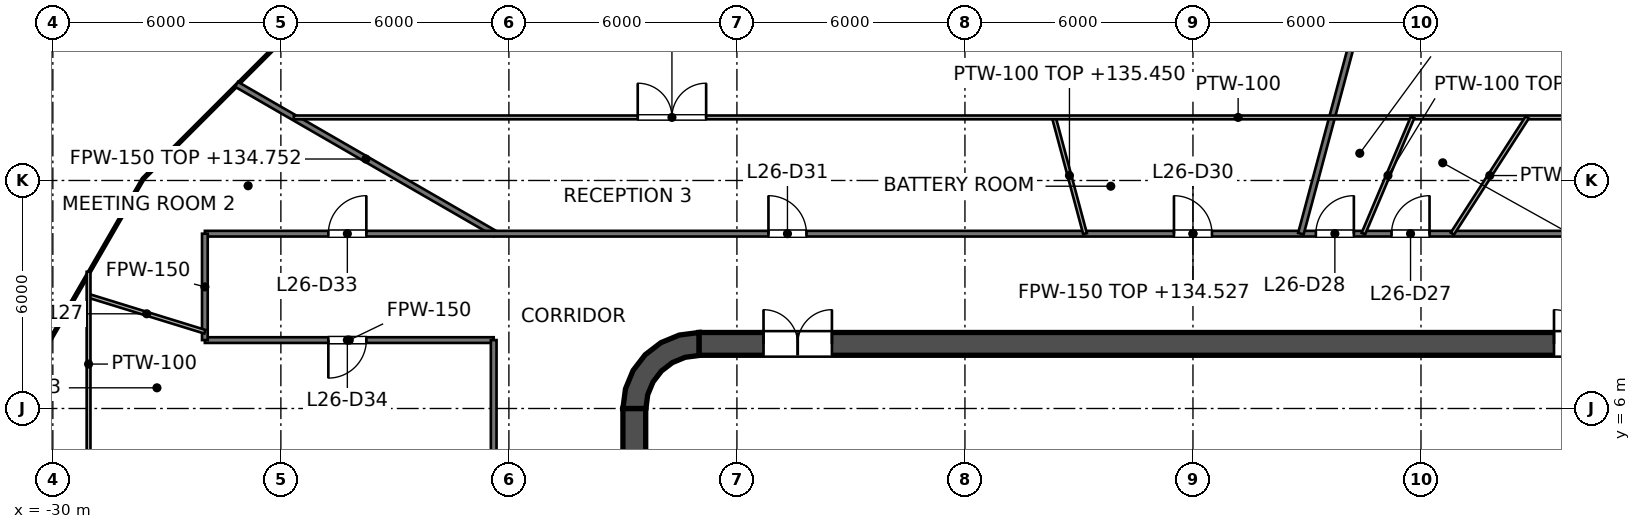
"""IFC4 building model, lengths in metres.
Left out: names, types, materials, properties, quantities, classifications, styles, units other than length and angle.
Written with IfcOpenShell. Run it as: python <this file> out.ifc"""

import sys

from ifc_helpers import new_model, si_unit, direction, frame, frame_2d, origin, place, context, subcontext, project, spatial, polyline, rectangle, outline, extrude, element, fill, save


model = new_model("IFC4")
c1 = context("Model", 3, precision=1e-05, world=origin(), true_north=direction((0.0, 1.0)))
c2 = subcontext(c1, "Body", "Model", "MODEL_VIEW")
j1 = project(units=[si_unit("LENGTHUNIT", "METRE"), si_unit("PLANEANGLEUNIT", "RADIAN")], contexts=[c1])
p1 = place(None, origin())
s1 = spatial("IfcSite", under=j1, at=p1, CompositionType="ELEMENT")
p2 = place(p1, origin())
s2 = spatial("IfcBuilding", under=s1, at=p2, CompositionType="ELEMENT")
p3 = place(p2, frame((0.0, 0.0, 131.4)))
s3 = spatial("IfcBuildingStorey", under=s2, at=p3, CompositionType="ELEMENT", Elevation=131.4)
p4 = place(p3, frame((-13.0, 7.7, 0.0), z_axis=(0.0, 0.0, 1.0), x_axis=(1.0, 0.0, 0.0)))
e1 = element("IfcWall", 1, at=p4, inside=s3, PredefinedType="SHEAR", context=c2, shape_type="SweptSolid", body=[
    extrude(rectangle(XDim=26.0, YDim=0.6, at=frame_2d((13.0, 0.0))), origin(), (0.0, 0.0, 1.0), 4.2),
])
p5 = place(p4, frame((1.7, 0.0, 0.0)))
e2 = element("IfcOpeningElement", 2, at=p5, cuts=e1, PredefinedType="OPENING", context=c2, shape_type="SweptSolid", body=[
    extrude(rectangle(XDim=1.8, YDim=2.1, at=frame_2d((0.9, 1.05))), frame((0.0, 0.3, 0.0), z_axis=(0.0, -1.0, 0.0), x_axis=(1.0, 0.0, 0.0)), (0.0, 0.0, 1.0), 0.6),
])
p6 = place(p4, frame((22.5, 0.0, 0.0)))
e3 = element("IfcOpeningElement", 3, at=p6, cuts=e1, PredefinedType="OPENING", context=c2, shape_type="SweptSolid", body=[
    extrude(rectangle(XDim=1.8, YDim=2.1, at=frame_2d((0.9, 1.05))), frame((0.0, 0.3, 0.0), z_axis=(0.0, -1.0, 0.0), x_axis=(1.0, 0.0, 0.0)), (0.0, 0.0, 1.0), 0.6),
])
p7 = place(p3, frame((-14.7, -6.0, 0.0), z_axis=(0.0, 0.0, 1.0), x_axis=(0.0, 1.0, 0.0)))
e4 = element("IfcWall", 4, at=p7, inside=s3, PredefinedType="SHEAR", context=c2, shape_type="SweptSolid", body=[
    extrude(rectangle(XDim=12.0, YDim=0.6, at=frame_2d((6.0, 0.0))), origin(), (0.0, 0.0, 1.0), 4.2),
])
p8 = place(p3, origin())
e5 = element("IfcWall", 5, at=p8, inside=s3, PredefinedType="SHEAR", context=c2, shape_type="SweptSolid", body=[
    extrude(outline(polyline([(-15.0, 6.0), (-14.395, 6.0), (-14.347, 6.361), (-14.208, 6.698), (-13.986, 6.986), (-13.698, 7.208), (-13.361, 7.347), (-13.0, 7.395), (-13.0, 8.0), (-13.518, 7.932), (-14.0, 7.732), (-14.414, 7.414), (-14.732, 7.0), (-14.932, 6.518), (-15.0, 6.0)])), origin(), (0.0, 0.0, 1.0), 4.2),
])
p9 = place(p3, frame((-9.0, 4.1, 0.0), z_axis=(0.0, 0.0, 1.0), x_axis=(0.0, 1.0, 0.0)))
e6 = element("IfcWall", 6, at=p9, inside=s3, PredefinedType="SOLIDWALL", context=c2, shape_type="SweptSolid", body=[
    extrude(rectangle(XDim=2.5, YDim=0.25, at=frame_2d((1.25, 0.0))), origin(), (0.0, 0.0, 1.0), 4.05),
])
p10 = place(p9, frame((0.65, 0.0, 0.0)))
e7 = element("IfcOpeningElement", 7, at=p10, cuts=e6, PredefinedType="OPENING", context=c2, shape_type="SweptSolid", body=[
    extrude(rectangle(XDim=1.2, YDim=2.1, at=frame_2d((0.6, 1.05))), frame((0.0, 0.125, 0.0), z_axis=(0.0, -1.0, 0.0), x_axis=(1.0, 0.0, 0.0)), (0.0, 0.0, 1.0), 0.25),
])
p11 = place(p3, frame((9.0, 4.1, 0.0), z_axis=(0.0, 0.0, 1.0), x_axis=(0.0, 1.0, 0.0)))
e8 = element("IfcWall", 8, at=p11, inside=s3, PredefinedType="SOLIDWALL", context=c2, shape_type="SweptSolid", body=[
    extrude(rectangle(XDim=2.5, YDim=0.25, at=frame_2d((1.25, 0.0))), origin(), (0.0, 0.0, 1.0), 4.05),
])
p12 = place(p11, frame((0.65, 0.0, 0.0)))
e9 = element("IfcOpeningElement", 9, at=p12, cuts=e8, PredefinedType="OPENING", context=c2, shape_type="SweptSolid", body=[
    extrude(rectangle(XDim=1.2, YDim=2.1, at=frame_2d((0.6, 1.05))), frame((0.0, 0.125, 0.0), z_axis=(0.0, -1.0, 0.0), x_axis=(1.0, 0.0, 0.0)), (0.0, 0.0, 1.0), 0.25),
])
for number, where, z_axis, x_axis in (
    (10, (-3.15, 4.1, 0.0), (0.0, 0.0, 1.0), (0.0, 1.0, 0.0)),
    (11, (3.15, 4.1, 0.0), (0.0, 0.0, 1.0), (0.0, 1.0, 0.0)),
):
    element("IfcWall", number, at=place(p3, frame(where, z_axis=z_axis, x_axis=x_axis)), inside=s3, PredefinedType="SOLIDWALL", context=c2, shape_type="SweptSolid", body=[
        extrude(rectangle(XDim=2.5, YDim=0.25, at=frame_2d((1.25, 0.0))), origin(), (0.0, 0.0, 1.0), 4.05),
    ])
p13 = place(p3, frame((-9.125, 7.0, 0.0), z_axis=(0.0, 0.0, 1.0), x_axis=(1.0, 0.0, 0.0)))
e12 = element("IfcWall", 12, at=p13, inside=s3, PredefinedType="SOLIDWALL", context=c2, shape_type="SweptSolid", body=[
    extrude(rectangle(XDim=18.25, YDim=0.8, at=frame_2d((9.125, 0.0))), origin(), (0.0, 0.0, 1.0), 4.05),
])
p14 = place(p3, frame((-11.8, -7.4, 0.0), z_axis=(0.0, 0.0, 1.0), x_axis=(0.0, 1.0, 0.0)))
e13 = element("IfcWall", 13, at=p14, inside=s3, PredefinedType="SOLIDWALL", context=c2, shape_type="SweptSolid", body=[
    extrude(rectangle(XDim=14.8, YDim=0.4, at=frame_2d((7.4, 0.0))), origin(), (0.0, 0.0, 1.0), 4.05),
])
p15 = place(p14, frame((11.2, 0.0, 0.0)))
e14 = element("IfcOpeningElement", 14, at=p15, cuts=e13, PredefinedType="OPENING", context=c2, shape_type="SweptSolid", body=[
    extrude(rectangle(XDim=1.1, YDim=2.1, at=frame_2d((0.55, 1.05))), frame((0.0, 0.2, 0.0), z_axis=(0.0, -1.0, 0.0), x_axis=(1.0, 0.0, 0.0)), (0.0, 0.0, 1.0), 0.4),
])
p16 = place(p14, frame((8.3, 0.0, 0.0)))
e15 = element("IfcOpeningElement", 15, at=p16, cuts=e13, PredefinedType="OPENING", context=c2, shape_type="SweptSolid", body=[
    extrude(rectangle(XDim=1.1, YDim=2.1, at=frame_2d((0.55, 1.05))), frame((0.0, 0.2, 0.0), z_axis=(0.0, -1.0, 0.0), x_axis=(1.0, 0.0, 0.0)), (0.0, 0.0, 1.0), 0.4),
])
p17 = place(p14, frame((5.4, 0.0, 0.0)))
e16 = element("IfcOpeningElement", 16, at=p17, cuts=e13, PredefinedType="OPENING", context=c2, shape_type="SweptSolid", body=[
    extrude(rectangle(XDim=1.1, YDim=2.1, at=frame_2d((0.55, 1.05))), frame((0.0, 0.2, 0.0), z_axis=(0.0, -1.0, 0.0), x_axis=(1.0, 0.0, 0.0)), (0.0, 0.0, 1.0), 0.4),
])
p18 = place(p14, frame((13.552, 0.0, 0.0)))
e17 = element("IfcOpeningElement", 17, at=p18, cuts=e13, PredefinedType="OPENING", context=c2, shape_type="SweptSolid", body=[
    extrude(rectangle(XDim=0.9, YDim=2.1, at=frame_2d((0.45, 1.05))), frame((0.0, 0.2, 0.0), z_axis=(0.0, -1.0, 0.0), x_axis=(1.0, 0.0, 0.0)), (0.0, 0.0, 1.0), 0.4),
])
p19 = place(p14, frame((0.347, 0.0, 0.0)))
e18 = element("IfcOpeningElement", 18, at=p19, cuts=e13, PredefinedType="OPENING", context=c2, shape_type="SweptSolid", body=[
    extrude(rectangle(XDim=0.9, YDim=2.1, at=frame_2d((0.45, 1.05))), frame((0.0, 0.2, 0.0), z_axis=(0.0, -1.0, 0.0), x_axis=(1.0, 0.0, 0.0)), (0.0, 0.0, 1.0), 0.4),
])
e19 = element("IfcWall", 19, at=p8, inside=s3, PredefinedType="SOLIDWALL", context=c2, shape_type="SweptSolid", body=[
    extrude(outline(polyline([(-12.0, -5.925), (-12.0, -5.675), (-14.15, -5.675), (-14.15, -3.025), (-12.0, -3.025), (-12.0, -2.775), (-14.15, -2.775), (-14.15, -0.125), (-12.0, -0.125), (-12.0, 0.125), (-14.15, 0.125), (-14.15, 2.775), (-12.0, 2.775), (-12.0, 3.025), (-14.15, 3.025), (-14.15, 5.675), (-12.0, 5.675), (-12.0, 5.925), (-14.15, 5.925), (-14.4, 5.925), (-14.4, 5.675), (-14.4, 3.025), (-14.4, 2.775), (-14.4, 0.125), (-14.4, -0.125), (-14.4, -2.775), (-14.4, -3.025), (-14.4, -5.675), (-14.4, -5.925), (-14.15, -5.925), (-12.0, -5.925)])), origin(), (0.0, 0.0, 1.0), 4.05),
])
p20 = place(p3, frame((-25.166, 14.53, 0.0), z_axis=(0.0, 0.0, 1.0), x_axis=(0.866034552186, -0.499984154169, 0.0)))
e20 = element("IfcWall", 20, at=p20, inside=s3, PredefinedType="PARTITIONING", context=c2, shape_type="SweptSolid", body=[
    extrude(rectangle(XDim=7.86, YDim=0.15, at=frame_2d((3.93, 0.0))), origin(), (0.0, 0.0, 1.0), 3.352),
])
p21 = place(p3, frame((-26.0, 7.8, 0.0), z_axis=(0.0, 0.0, 1.0), x_axis=(1.0, 0.0, 0.0)))
e21 = element("IfcWall", 21, at=p21, inside=s3, PredefinedType="PARTITIONING", context=c2, shape_type="SweptSolid", body=[
    extrude(rectangle(XDim=7.6, YDim=0.15, at=frame_2d((3.8, 0.0))), origin(), (0.0, 0.0, 1.0), 3.276),
])
p22 = place(p21, frame((3.249, 0.0, 0.0)))
e22 = element("IfcOpeningElement", 22, at=p22, cuts=e21, PredefinedType="OPENING", context=c2, shape_type="SweptSolid", body=[
    extrude(rectangle(XDim=1.0, YDim=2.1, at=frame_2d((0.5, 1.05))), frame((0.0, 0.075, 0.0), z_axis=(0.0, -1.0, 0.0), x_axis=(1.0, 0.0, 0.0)), (0.0, 0.0, 1.0), 0.15),
])
p23 = place(p3, frame((-26.0, 10.6, 0.0), z_axis=(0.0, 0.0, 1.0), x_axis=(1.0, 0.0, 0.0)))
e23 = element("IfcWall", 23, at=p23, inside=s3, PredefinedType="PARTITIONING", context=c2, shape_type="SweptSolid", body=[
    extrude(rectangle(XDim=52.0, YDim=0.15, at=frame_2d((26.0, 0.0))), origin(), (0.0, 0.0, 1.0), 3.127),
])
p24 = place(p23, frame((41.863, 0.0, 0.0)))
e24 = element("IfcOpeningElement", 24, at=p24, cuts=e23, PredefinedType="OPENING", context=c2, shape_type="SweptSolid", body=[
    extrude(rectangle(XDim=1.2, YDim=2.1, at=frame_2d((0.6, 1.05))), frame((0.0, 0.075, 0.0), z_axis=(0.0, -1.0, 0.0), x_axis=(1.0, 0.0, 0.0)), (0.0, 0.0, 1.0), 0.15),
])
p25 = place(p23, frame((31.225, 0.0, 0.0)))
e25 = element("IfcOpeningElement", 25, at=p25, cuts=e23, PredefinedType="OPENING", context=c2, shape_type="SweptSolid", body=[
    extrude(rectangle(XDim=1.0, YDim=2.1, at=frame_2d((0.5, 1.05))), frame((0.0, 0.075, 0.0), z_axis=(0.0, -1.0, 0.0), x_axis=(1.0, 0.0, 0.0)), (0.0, 0.0, 1.0), 0.15),
])
p26 = place(p23, frame((29.234, 0.0, 0.0)))
e26 = element("IfcOpeningElement", 26, at=p26, cuts=e23, PredefinedType="OPENING", context=c2, shape_type="SweptSolid", body=[
    extrude(rectangle(XDim=1.0, YDim=2.1, at=frame_2d((0.5, 1.05))), frame((0.0, 0.075, 0.0), z_axis=(0.0, -1.0, 0.0), x_axis=(1.0, 0.0, 0.0)), (0.0, 0.0, 1.0), 0.15),
])
p27 = place(p23, frame((25.5, 0.0, 0.0)))
e27 = element("IfcOpeningElement", 27, at=p27, cuts=e23, PredefinedType="OPENING", context=c2, shape_type="SweptSolid", body=[
    extrude(rectangle(XDim=1.0, YDim=2.1, at=frame_2d((0.5, 1.05))), frame((0.0, 0.075, 0.0), z_axis=(0.0, -1.0, 0.0), x_axis=(1.0, 0.0, 0.0)), (0.0, 0.0, 1.0), 0.15),
])
p28 = place(p23, frame((14.83, 0.0, 0.0)))
e28 = element("IfcOpeningElement", 28, at=p28, cuts=e23, PredefinedType="OPENING", context=c2, shape_type="SweptSolid", body=[
    extrude(rectangle(XDim=1.0, YDim=2.1, at=frame_2d((0.5, 1.05))), frame((0.0, 0.075, 0.0), z_axis=(0.0, -1.0, 0.0), x_axis=(1.0, 0.0, 0.0)), (0.0, 0.0, 1.0), 0.15),
])
p29 = place(p23, frame((3.249, 0.0, 0.0)))
e29 = element("IfcOpeningElement", 29, at=p29, cuts=e23, PredefinedType="OPENING", context=c2, shape_type="SweptSolid", body=[
    extrude(rectangle(XDim=1.0, YDim=2.1, at=frame_2d((0.5, 1.05))), frame((0.0, 0.075, 0.0), z_axis=(0.0, -1.0, 0.0), x_axis=(1.0, 0.0, 0.0)), (0.0, 0.0, 1.0), 0.15),
])
p30 = place(p3, frame((2.84, 10.6, 0.0), z_axis=(0.0, 0.0, 1.0), x_axis=(0.258833974298, 0.9659218259, 0.0)))
e30 = element("IfcWall", 30, at=p30, inside=s3, PredefinedType="PARTITIONING", context=c2, shape_type="SweptSolid", body=[
    extrude(rectangle(XDim=13.464, YDim=0.15, at=frame_2d((6.732, 0.0))), origin(), (0.0, 0.0, 1.0), 3.502),
])
p31 = place(p3, frame((-18.4, -7.8, 0.0), z_axis=(0.0, 0.0, 1.0), x_axis=(0.0, 1.0, 0.0)))
e31 = element("IfcWall", 31, at=p31, inside=s3, PredefinedType="PARTITIONING", context=c2, shape_type="SweptSolid", body=[
    extrude(rectangle(XDim=15.6, YDim=0.15, at=frame_2d((7.8, 0.0))), origin(), (0.0, 0.0, 1.0), 3.127),
])
p32 = place(p31, frame((5.474, 0.0, 0.0)))
e32 = element("IfcOpeningElement", 32, at=p32, cuts=e31, PredefinedType="OPENING", context=c2, shape_type="SweptSolid", body=[
    extrude(rectangle(XDim=1.0, YDim=2.1, at=frame_2d((0.5, 1.05))), frame((0.0, 0.075, 0.0), z_axis=(0.0, -1.0, 0.0), x_axis=(1.0, 0.0, 0.0)), (0.0, 0.0, 1.0), 0.15),
])
p33 = place(p3, frame((-26.0, 7.8, 0.0), z_axis=(0.0, 0.0, 1.0), x_axis=(0.0, 1.0, 0.0)))
e33 = element("IfcWall", 33, at=p33, inside=s3, PredefinedType="PARTITIONING", context=c2, shape_type="SweptSolid", body=[
    extrude(rectangle(XDim=2.8, YDim=0.15, at=frame_2d((1.4, 0.0))), origin(), (0.0, 0.0, 1.0), 3.276),
])
p34 = place(p3, frame((-3.66, 13.66, 0.0), z_axis=(0.0, 0.0, 1.0), x_axis=(0.258804143637, -0.965929819001, 0.0)))
e34 = element("IfcWall", 34, at=p34, inside=s3, PredefinedType="PARTITIONING", context=c2, shape_type="SweptSolid", body=[
    extrude(rectangle(XDim=3.168, YDim=0.1, at=frame_2d((1.584, 0.0))), origin(), (0.0, 0.0, 1.0), 4.05),
])
p35 = place(p3, frame((-29.06, 8.964, 0.0), z_axis=(0.0, 0.0, 1.0), x_axis=(0.955556205091, -0.294808987162, 0.0)))
e35 = element("IfcWall", 35, at=p35, inside=s3, PredefinedType="PARTITIONING", context=c2, shape_type="SweptSolid", body=[
    extrude(rectangle(XDim=3.202, YDim=0.1, at=frame_2d((1.601, 0.0))), origin(), (0.0, 0.0, 1.0), 3.727),
])
p36 = place(p3, frame((-23.659, 13.66, 0.0), z_axis=(0.0, 0.0, 1.0), x_axis=(1.0, 0.0, 0.0)))
e36 = element("IfcWall", 36, at=p36, inside=s3, PredefinedType="PARTITIONING", context=c2, shape_type="SweptSolid", body=[
    extrude(rectangle(XDim=49.695, YDim=0.1, at=frame_2d((24.847, 0.0))), origin(), (0.0, 0.0, 1.0), 3.127),
])
p37 = place(p36, frame((40.675, 0.0, 0.0)))
e37 = element("IfcOpeningElement", 37, at=p37, cuts=e36, PredefinedType="OPENING", context=c2, shape_type="SweptSolid", body=[
    extrude(rectangle(XDim=0.9, YDim=2.1, at=frame_2d((0.45, 1.05))), frame((0.0, 0.05, 0.0), z_axis=(0.0, -1.0, 0.0), x_axis=(1.0, 0.0, 0.0)), (0.0, 0.0, 1.0), 0.1),
])
p38 = place(p36, frame((9.049, 0.0, 0.0)))
e38 = element("IfcOpeningElement", 38, at=p38, cuts=e36, PredefinedType="OPENING", context=c2, shape_type="SweptSolid", body=[
    extrude(rectangle(XDim=1.8, YDim=2.1, at=frame_2d((0.9, 1.05))), frame((0.0, 0.05, 0.0), z_axis=(0.0, -1.0, 0.0), x_axis=(1.0, 0.0, 0.0)), (0.0, 0.0, 1.0), 0.1),
])
p39 = place(p3, frame((6.825, 10.6, 0.0), z_axis=(0.0, 0.0, 1.0), x_axis=(0.541330496355, 0.840809903436, 0.0)))
e39 = element("IfcWall", 39, at=p39, inside=s3, PredefinedType="PARTITIONING", context=c2, shape_type="SweptSolid", body=[
    extrude(rectangle(XDim=3.639, YDim=0.1, at=frame_2d((1.82, 0.0))), origin(), (0.0, 0.0, 1.0), 4.05),
])
p40 = place(p3, frame((4.484, 10.6, 0.0), z_axis=(0.0, 0.0, 1.0), x_axis=(0.389551289035, 0.921004773718, 0.0)))
e40 = element("IfcWall", 40, at=p40, inside=s3, PredefinedType="PARTITIONING", context=c2, shape_type="SweptSolid", body=[
    extrude(rectangle(XDim=3.322, YDim=0.1, at=frame_2d((1.661, 0.0))), origin(), (0.0, 0.0, 1.0), 4.05),
])
p41 = place(p3, frame((-29.06, 4.74, 0.0), z_axis=(0.0, 0.0, 1.0), x_axis=(0.0, 1.0, 0.0)))
e41 = element("IfcWall", 41, at=p41, inside=s3, PredefinedType="PARTITIONING", context=c2, shape_type="SweptSolid", body=[
    extrude(rectangle(XDim=4.858, YDim=0.1, at=frame_2d((2.429, 0.0))), origin(), (0.0, 0.0, 1.0), 3.127),
])
p42 = place(p10, origin())
e42 = element("IfcDoor", 42, at=p42, inside=s3, OperationType="SINGLE_SWING_RIGHT", PredefinedType="DOOR", context=c2, shape_type="SweptSolid", body=[
    extrude(rectangle(XDim=1.2, YDim=2.1, at=frame_2d((0.6, 1.05))), frame((0.0, 0.025, 0.0), z_axis=(0.0, -1.0, 0.0), x_axis=(1.0, 0.0, 0.0)), (0.0, 0.0, 1.0), 0.05),
])
fill(e7, e42)
p43 = place(p12, origin())
e43 = element("IfcDoor", 43, at=p43, inside=s3, OperationType="SINGLE_SWING_LEFT", PredefinedType="DOOR", context=c2, shape_type="SweptSolid", body=[
    extrude(rectangle(XDim=1.2, YDim=2.1, at=frame_2d((0.6, 1.05))), frame((0.0, 0.025, 0.0), z_axis=(0.0, -1.0, 0.0), x_axis=(1.0, 0.0, 0.0)), (0.0, 0.0, 1.0), 0.05),
])
fill(e9, e43)
p44 = place(p18, origin())
e44 = element("IfcDoor", 44, at=p44, inside=s3, OperationType="SINGLE_SWING_LEFT", PredefinedType="DOOR", context=c2, shape_type="SweptSolid", body=[
    extrude(rectangle(XDim=0.9, YDim=2.1, at=frame_2d((0.45, 1.05))), frame((0.0, 0.025, 0.0), z_axis=(0.0, -1.0, 0.0), x_axis=(1.0, 0.0, 0.0)), (0.0, 0.0, 1.0), 0.05),
])
fill(e17, e44)
p45 = place(p5, origin())
e45 = element("IfcDoor", 45, at=p45, inside=s3, OperationType="DOUBLE_DOOR_SINGLE_SWING", PredefinedType="DOOR", context=c2, shape_type="SweptSolid", body=[
    extrude(rectangle(XDim=1.8, YDim=2.1, at=frame_2d((0.9, 1.05))), frame((0.0, 0.025, 0.0), z_axis=(0.0, -1.0, 0.0), x_axis=(1.0, 0.0, 0.0)), (0.0, 0.0, 1.0), 0.05),
])
fill(e2, e45)
p46 = place(p6, origin())
e46 = element("IfcDoor", 46, at=p46, inside=s3, OperationType="DOUBLE_DOOR_SINGLE_SWING", PredefinedType="DOOR", context=c2, shape_type="SweptSolid", body=[
    extrude(rectangle(XDim=1.8, YDim=2.1, at=frame_2d((0.9, 1.05))), frame((0.0, 0.025, 0.0), z_axis=(0.0, -1.0, 0.0), x_axis=(1.0, 0.0, 0.0)), (0.0, 0.0, 1.0), 0.05),
])
fill(e3, e46)
p47 = place(p25, origin())
e47 = element("IfcDoor", 47, at=p47, inside=s3, OperationType="SINGLE_SWING_RIGHT", PredefinedType="DOOR", context=c2, shape_type="SweptSolid", body=[
    extrude(rectangle(XDim=1.0, YDim=2.1, at=frame_2d((0.5, 1.05))), frame((0.0, 0.025, 0.0), z_axis=(0.0, -1.0, 0.0), x_axis=(1.0, 0.0, 0.0)), (0.0, 0.0, 1.0), 0.05),
])
fill(e25, e47)
p48 = place(p26, origin())
e48 = element("IfcDoor", 48, at=p48, inside=s3, OperationType="SINGLE_SWING_RIGHT", PredefinedType="DOOR", context=c2, shape_type="SweptSolid", body=[
    extrude(rectangle(XDim=1.0, YDim=2.1, at=frame_2d((0.5, 1.05))), frame((0.0, 0.025, 0.0), z_axis=(0.0, -1.0, 0.0), x_axis=(1.0, 0.0, 0.0)), (0.0, 0.0, 1.0), 0.05),
])
fill(e26, e48)
p49 = place(p27, origin())
e49 = element("IfcDoor", 49, at=p49, inside=s3, OperationType="SINGLE_SWING_LEFT", PredefinedType="DOOR", context=c2, shape_type="SweptSolid", body=[
    extrude(rectangle(XDim=1.0, YDim=2.1, at=frame_2d((0.5, 1.05))), frame((0.0, 0.025, 0.0), z_axis=(0.0, -1.0, 0.0), x_axis=(1.0, 0.0, 0.0)), (0.0, 0.0, 1.0), 0.05),
])
fill(e27, e49)
p50 = place(p28, origin())
e50 = element("IfcDoor", 50, at=p50, inside=s3, OperationType="SINGLE_SWING_LEFT", PredefinedType="DOOR", context=c2, shape_type="SweptSolid", body=[
    extrude(rectangle(XDim=1.0, YDim=2.1, at=frame_2d((0.5, 1.05))), frame((0.0, 0.025, 0.0), z_axis=(0.0, -1.0, 0.0), x_axis=(1.0, 0.0, 0.0)), (0.0, 0.0, 1.0), 0.05),
])
fill(e28, e50)
p51 = place(p38, origin())
e51 = element("IfcDoor", 51, at=p51, inside=s3, OperationType="DOUBLE_DOOR_SINGLE_SWING", PredefinedType="DOOR", context=c2, shape_type="SweptSolid", body=[
    extrude(rectangle(XDim=1.8, YDim=2.1, at=frame_2d((0.9, 1.05))), frame((0.0, 0.025, 0.0), z_axis=(0.0, -1.0, 0.0), x_axis=(1.0, 0.0, 0.0)), (0.0, 0.0, 1.0), 0.05),
])
fill(e38, e51)
p52 = place(p29, origin())
e52 = element("IfcDoor", 52, at=p52, inside=s3, OperationType="SINGLE_SWING_RIGHT", PredefinedType="DOOR", context=c2, shape_type="SweptSolid", body=[
    extrude(rectangle(XDim=1.0, YDim=2.1, at=frame_2d((0.5, 1.05))), frame((0.0, 0.025, 0.0), z_axis=(0.0, -1.0, 0.0), x_axis=(1.0, 0.0, 0.0)), (0.0, 0.0, 1.0), 0.05),
])
fill(e29, e52)
p53 = place(p22, origin())
e53 = element("IfcDoor", 53, at=p53, inside=s3, OperationType="SINGLE_SWING_LEFT", PredefinedType="DOOR", context=c2, shape_type="SweptSolid", body=[
    extrude(rectangle(XDim=1.0, YDim=2.1, at=frame_2d((0.5, 1.05))), frame((0.0, 0.025, 0.0), z_axis=(0.0, -1.0, 0.0), x_axis=(1.0, 0.0, 0.0)), (0.0, 0.0, 1.0), 0.05),
])
fill(e22, e53)
save(model, sys.argv[1])
